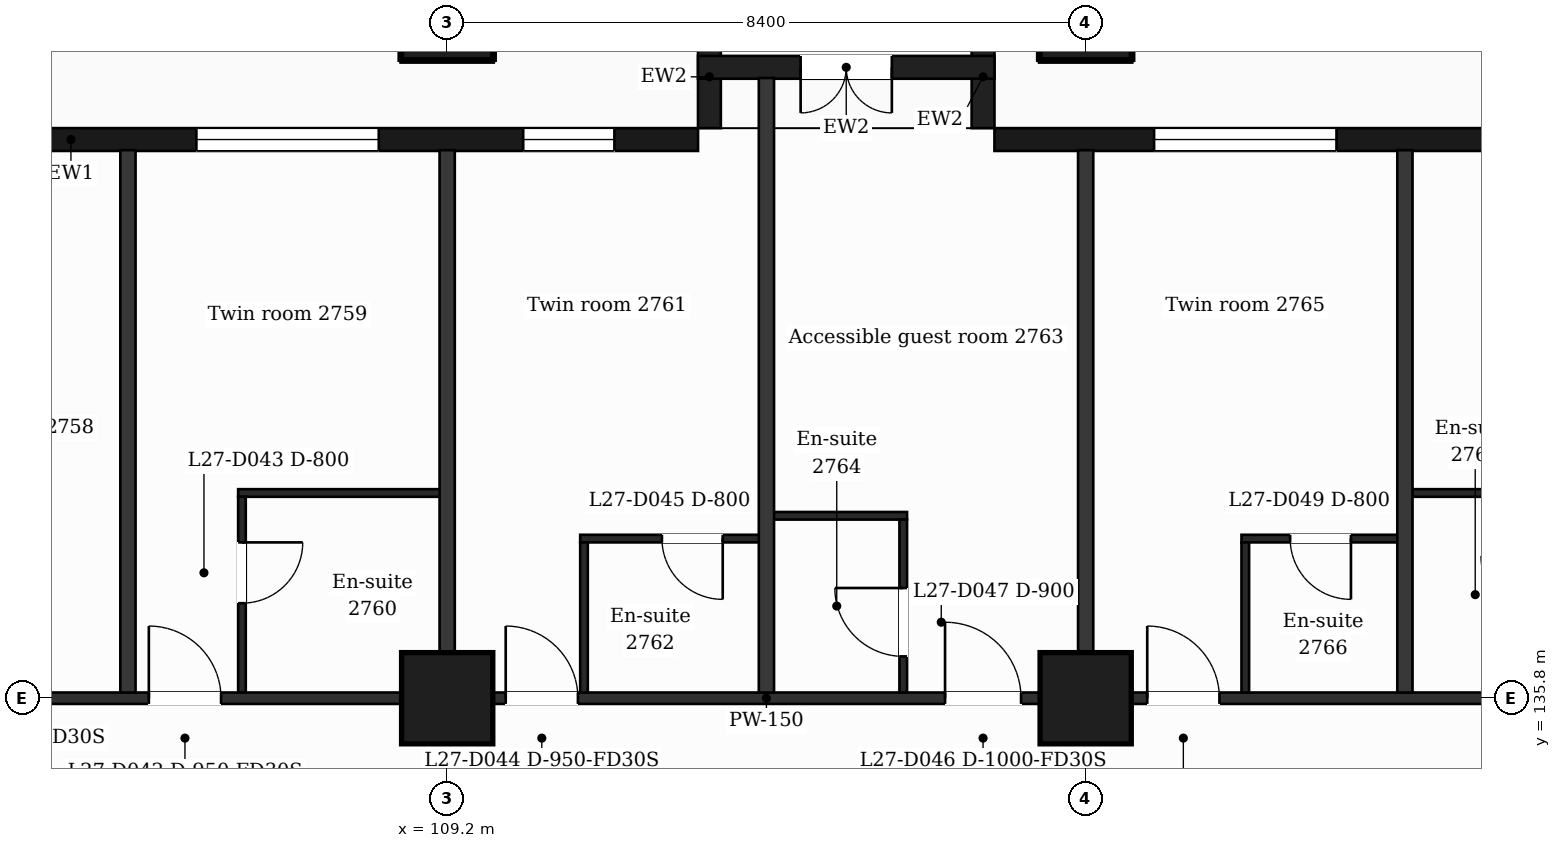
"""IFC4 building model, lengths in metres.
Left out: names, types, materials, properties, quantities, classifications, styles, units other than length and angle.
Written with IfcOpenShell. Run it as: python <this file> out.ifc"""

import sys

from ifc_helpers import new_model, si_unit, direction, frame, frame_2d, origin, origin_2d, place, context, subcontext, project, spatial, rectangle, extrude, element, fill, save


model = new_model("IFC4")
c1 = context("Model", 3, precision=1e-05, world=origin(), true_north=direction((0.0, 1.0)))
c2 = subcontext(c1, "Body", "Model", "MODEL_VIEW")
j1 = project(units=[si_unit("LENGTHUNIT", "METRE"), si_unit("PLANEANGLEUNIT", "RADIAN")], contexts=[c1])
p1 = place(None, origin())
s1 = spatial("IfcSite", under=j1, at=p1, CompositionType="ELEMENT")
p2 = place(p1, origin())
s2 = spatial("IfcBuilding", under=s1, at=p2, CompositionType="ELEMENT")
p3 = place(p2, frame((0.0, 0.0, 116.9)))
s3 = spatial("IfcBuildingStorey", under=s2, at=p3, CompositionType="ELEMENT", Elevation=116.9)
for number, where, z_axis, x_axis in (
    (1, (109.2, 135.8, 0.0), (0.0, 0.0, 1.0), (1.0, 0.0, 0.0)),
    (2, (117.6, 135.8, 0.0), (0.0, 0.0, 1.0), (1.0, 0.0, 0.0)),
    (3, (109.2, 144.8, 0.0), (0.0, 0.0, 1.0), (1.0, 0.0, 0.0)),
    (4, (117.6, 144.8, 0.0), (0.0, 0.0, 1.0), (1.0, 0.0, 0.0)),
):
    element("IfcColumn", number, at=place(p3, frame(where, z_axis=z_axis, x_axis=x_axis)), inside=s3, PredefinedType="COLUMN", context=c2, shape_type="SweptSolid", body=[
        extrude(rectangle(XDim=1.2, YDim=1.2, at=origin_2d()), origin(), (0.0, 0.0, 1.0), 3.7),
    ])
p4 = place(p3, frame((130.65, 143.15, 0.0), z_axis=(0.0, 0.0, 1.0), x_axis=(-1.0, 0.0, 0.0)))
e5 = element("IfcWall", 5, at=p4, inside=s3, PredefinedType="SOLIDWALL", context=c2, shape_type="SweptSolid", body=[
    extrude(rectangle(XDim=14.25, YDim=0.3, at=frame_2d((7.125, 0.0))), origin(), (0.0, 0.0, 1.0), 3.38),
])
p5 = place(p4, frame((1.35, 0.0, 0.9)))
e6 = element("IfcOpeningElement", 6, at=p5, cuts=e5, PredefinedType="OPENING", context=c2, shape_type="SweptSolid", body=[
    extrude(rectangle(XDim=2.4, YDim=2.1, at=frame_2d((1.2, 1.05))), frame((0.0, 0.16, 0.0), z_axis=(0.0, -1.0, 0.0), x_axis=(1.0, 0.0, 0.0)), (0.0, 0.0, 1.0), 0.32),
])
p6 = place(p4, frame((6.15, 0.0, 0.0)))
e7 = element("IfcOpeningElement", 7, at=p6, cuts=e5, PredefinedType="OPENING", context=c2, shape_type="SweptSolid", body=[
    extrude(rectangle(XDim=1.2, YDim=2.4, at=frame_2d((0.6, 1.2))), frame((0.0, 0.16, 0.0), z_axis=(0.0, -1.0, 0.0), x_axis=(1.0, 0.0, 0.0)), (0.0, 0.0, 1.0), 0.32),
])
p7 = place(p4, frame((9.75, 0.0, 0.9)))
e8 = element("IfcOpeningElement", 8, at=p7, cuts=e5, PredefinedType="OPENING", context=c2, shape_type="SweptSolid", body=[
    extrude(rectangle(XDim=2.4, YDim=2.1, at=frame_2d((1.2, 1.05))), frame((0.0, 0.16, 0.0), z_axis=(0.0, -1.0, 0.0), x_axis=(1.0, 0.0, 0.0)), (0.0, 0.0, 1.0), 0.32),
])
p8 = place(p3, frame((112.5, 143.15, 0.0), z_axis=(0.0, 0.0, 1.0), x_axis=(-1.0, 0.0, 0.0)))
e9 = element("IfcWall", 9, at=p8, inside=s3, PredefinedType="SOLIDWALL", context=c2, shape_type="SweptSolid", body=[
    extrude(rectangle(XDim=16.5, YDim=0.3, at=frame_2d((8.25, 0.0))), origin(), (0.0, 0.0, 1.0), 3.38),
])
p9 = place(p8, frame((1.1, 0.0, 0.9)))
e10 = element("IfcOpeningElement", 10, at=p9, cuts=e9, PredefinedType="OPENING", context=c2, shape_type="SweptSolid", body=[
    extrude(rectangle(XDim=1.2, YDim=2.1, at=frame_2d((0.6, 1.05))), frame((0.0, 0.16, 0.0), z_axis=(0.0, -1.0, 0.0), x_axis=(1.0, 0.0, 0.0)), (0.0, 0.0, 1.0), 0.32),
])
p10 = place(p8, frame((4.2, 0.0, 0.9)))
e11 = element("IfcOpeningElement", 11, at=p10, cuts=e9, PredefinedType="OPENING", context=c2, shape_type="SweptSolid", body=[
    extrude(rectangle(XDim=2.4, YDim=2.1, at=frame_2d((1.2, 1.05))), frame((0.0, 0.16, 0.0), z_axis=(0.0, -1.0, 0.0), x_axis=(1.0, 0.0, 0.0)), (0.0, 0.0, 1.0), 0.32),
])
p11 = place(p8, frame((9.0, 0.0, 0.0)))
e12 = element("IfcOpeningElement", 12, at=p11, cuts=e9, PredefinedType="OPENING", context=c2, shape_type="SweptSolid", body=[
    extrude(rectangle(XDim=1.2, YDim=2.4, at=frame_2d((0.6, 1.2))), frame((0.0, 0.16, 0.0), z_axis=(0.0, -1.0, 0.0), x_axis=(1.0, 0.0, 0.0)), (0.0, 0.0, 1.0), 0.32),
])
p12 = place(p8, frame((12.3, 0.0, 0.9)))
e13 = element("IfcOpeningElement", 13, at=p12, cuts=e9, PredefinedType="OPENING", context=c2, shape_type="SweptSolid", body=[
    extrude(rectangle(XDim=1.2, YDim=2.1, at=frame_2d((0.6, 1.05))), frame((0.0, 0.16, 0.0), z_axis=(0.0, -1.0, 0.0), x_axis=(1.0, 0.0, 0.0)), (0.0, 0.0, 1.0), 0.32),
])
p13 = place(p8, frame((14.1, 0.0, 0.9)))
e14 = element("IfcOpeningElement", 14, at=p13, cuts=e9, PredefinedType="OPENING", context=c2, shape_type="SweptSolid", body=[
    extrude(rectangle(XDim=1.2, YDim=2.1, at=frame_2d((0.6, 1.05))), frame((0.0, 0.16, 0.0), z_axis=(0.0, -1.0, 0.0), x_axis=(1.0, 0.0, 0.0)), (0.0, 0.0, 1.0), 0.32),
])
for number, where, z_axis, x_axis in (
    (15, (116.25, 143.3, 0.0), (0.0, 0.0, 1.0), (0.0, 1.0, 0.0)),
    (16, (112.65, 143.3, 0.0), (0.0, 0.0, 1.0), (0.0, 1.0, 0.0)),
):
    element("IfcWall", number, at=place(p3, frame(where, z_axis=z_axis, x_axis=x_axis)), inside=s3, PredefinedType="SOLIDWALL", context=c2, shape_type="SweptSolid", body=[
        extrude(rectangle(XDim=1.35, YDim=0.3, at=frame_2d((0.675, 0.0))), origin(), (0.0, 0.0, 1.0), 3.38),
    ])
p14 = place(p3, frame((116.4, 144.1, 0.0), z_axis=(0.0, 0.0, 1.0), x_axis=(-1.0, 0.0, 0.0)))
e17 = element("IfcWall", 17, at=p14, inside=s3, PredefinedType="SOLIDWALL", context=c2, shape_type="SweptSolid", body=[
    extrude(rectangle(XDim=3.9, YDim=0.3, at=frame_2d((1.95, 0.0))), origin(), (0.0, 0.0, 1.0), 3.38),
])
p15 = place(p14, frame((1.35, 0.0, 0.0)))
e18 = element("IfcOpeningElement", 18, at=p15, cuts=e17, PredefinedType="OPENING", context=c2, shape_type="SweptSolid", body=[
    extrude(rectangle(XDim=1.2, YDim=2.4, at=frame_2d((0.6, 1.2))), frame((0.0, 0.16, 0.0), z_axis=(0.0, -1.0, 0.0), x_axis=(1.0, 0.0, 0.0)), (0.0, 0.0, 1.0), 0.32),
])
p16 = place(p3, frame((90.895, 135.8, 0.0), z_axis=(0.0, 0.0, 1.0), x_axis=(1.0, 0.0, 0.0)))
e19 = element("IfcWall", 19, at=p16, inside=s3, PredefinedType="PARTITIONING", context=c2, shape_type="SweptSolid", body=[
    extrude(rectangle(XDim=45.011, YDim=0.15, at=frame_2d((22.505, 0.0))), origin(), (0.0, 0.0, 1.0), 3.38),
])
p17 = place(p16, frame((8.005, 0.0, 0.0)))
e20 = element("IfcOpeningElement", 20, at=p17, cuts=e19, PredefinedType="OPENING", context=c2, shape_type="SweptSolid", body=[
    extrude(rectangle(XDim=1.0, YDim=2.1, at=frame_2d((0.5, 1.05))), frame((0.0, 0.085, 0.0), z_axis=(0.0, -1.0, 0.0), x_axis=(1.0, 0.0, 0.0)), (0.0, 0.0, 1.0), 0.17),
])
p18 = place(p16, frame((11.785, 0.0, 0.0)))
e21 = element("IfcOpeningElement", 21, at=p18, cuts=e19, PredefinedType="OPENING", context=c2, shape_type="SweptSolid", body=[
    extrude(rectangle(XDim=0.95, YDim=2.1, at=frame_2d((0.475, 1.05))), frame((0.0, 0.085, 0.0), z_axis=(0.0, -1.0, 0.0), x_axis=(1.0, 0.0, 0.0)), (0.0, 0.0, 1.0), 0.17),
])
p19 = place(p16, frame((14.38, 0.0, 0.0)))
e22 = element("IfcOpeningElement", 22, at=p19, cuts=e19, PredefinedType="OPENING", context=c2, shape_type="SweptSolid", body=[
    extrude(rectangle(XDim=0.95, YDim=2.1, at=frame_2d((0.475, 1.05))), frame((0.0, 0.085, 0.0), z_axis=(0.0, -1.0, 0.0), x_axis=(1.0, 0.0, 0.0)), (0.0, 0.0, 1.0), 0.17),
])
p20 = place(p16, frame((19.075, 0.0, 0.0)))
e23 = element("IfcOpeningElement", 23, at=p20, cuts=e19, PredefinedType="OPENING", context=c2, shape_type="SweptSolid", body=[
    extrude(rectangle(XDim=0.95, YDim=2.1, at=frame_2d((0.475, 1.05))), frame((0.0, 0.085, 0.0), z_axis=(0.0, -1.0, 0.0), x_axis=(1.0, 0.0, 0.0)), (0.0, 0.0, 1.0), 0.17),
])
p21 = place(p16, frame((24.855, 0.0, 0.0)))
e24 = element("IfcOpeningElement", 24, at=p21, cuts=e19, PredefinedType="OPENING", context=c2, shape_type="SweptSolid", body=[
    extrude(rectangle(XDim=1.0, YDim=2.1, at=frame_2d((0.5, 1.05))), frame((0.0, 0.085, 0.0), z_axis=(0.0, -1.0, 0.0), x_axis=(1.0, 0.0, 0.0)), (0.0, 0.0, 1.0), 0.17),
])
p22 = place(p16, frame((27.515, 0.0, 0.0)))
e25 = element("IfcOpeningElement", 25, at=p22, cuts=e19, PredefinedType="OPENING", context=c2, shape_type="SweptSolid", body=[
    extrude(rectangle(XDim=0.95, YDim=2.1, at=frame_2d((0.475, 1.05))), frame((0.0, 0.085, 0.0), z_axis=(0.0, -1.0, 0.0), x_axis=(1.0, 0.0, 0.0)), (0.0, 0.0, 1.0), 0.17),
])
p23 = place(p16, frame((33.242, 0.0, 0.0)))
e26 = element("IfcOpeningElement", 26, at=p23, cuts=e19, PredefinedType="OPENING", context=c2, shape_type="SweptSolid", body=[
    extrude(rectangle(XDim=0.95, YDim=2.1, at=frame_2d((0.475, 1.05))), frame((0.0, 0.085, 0.0), z_axis=(0.0, -1.0, 0.0), x_axis=(1.0, 0.0, 0.0)), (0.0, 0.0, 1.0), 0.17),
])
p24 = place(p16, frame((37.105, 0.0, 0.0)))
e27 = element("IfcOpeningElement", 27, at=p24, cuts=e19, PredefinedType="OPENING", context=c2, shape_type="SweptSolid", body=[
    extrude(rectangle(XDim=1.0, YDim=2.1, at=frame_2d((0.5, 1.05))), frame((0.0, 0.085, 0.0), z_axis=(0.0, -1.0, 0.0), x_axis=(1.0, 0.0, 0.0)), (0.0, 0.0, 1.0), 0.17),
])
p25 = place(p3, frame((110.95, 137.9, 0.0), z_axis=(0.0, 0.0, 1.0), x_axis=(1.0, 0.0, 0.0)))
e28 = element("IfcWall", 28, at=p25, inside=s3, PredefinedType="PARTITIONING", context=c2, shape_type="SweptSolid", body=[
    extrude(rectangle(XDim=2.45, YDim=0.1, at=frame_2d((1.225, 0.0))), origin(), (0.0, 0.0, 1.0), 3.38),
])
p26 = place(p25, frame((1.075, 0.0, 0.0)))
e29 = element("IfcOpeningElement", 29, at=p26, cuts=e28, PredefinedType="OPENING", context=c2, shape_type="SweptSolid", body=[
    extrude(rectangle(XDim=0.8, YDim=2.1, at=frame_2d((0.4, 1.05))), frame((0.0, 0.06, 0.0), z_axis=(0.0, -1.0, 0.0), x_axis=(1.0, 0.0, 0.0)), (0.0, 0.0, 1.0), 0.12),
])
p27 = place(p3, frame((119.65, 137.9, 0.0), z_axis=(0.0, 0.0, 1.0), x_axis=(1.0, 0.0, 0.0)))
e30 = element("IfcWall", 30, at=p27, inside=s3, PredefinedType="PARTITIONING", context=c2, shape_type="SweptSolid", body=[
    extrude(rectangle(XDim=2.15, YDim=0.1, at=frame_2d((1.075, 0.0))), origin(), (0.0, 0.0, 1.0), 3.38),
])
p28 = place(p27, frame((0.64, 0.0, 0.0)))
e31 = element("IfcOpeningElement", 31, at=p28, cuts=e30, PredefinedType="OPENING", context=c2, shape_type="SweptSolid", body=[
    extrude(rectangle(XDim=0.8, YDim=2.1, at=frame_2d((0.4, 1.05))), frame((0.0, 0.06, 0.0), z_axis=(0.0, -1.0, 0.0), x_axis=(1.0, 0.0, 0.0)), (0.0, 0.0, 1.0), 0.12),
])
p29 = place(p3, frame((113.4, 138.2, 0.0), z_axis=(0.0, 0.0, 1.0), x_axis=(1.0, 0.0, 0.0)))
e32 = element("IfcWall", 32, at=p29, inside=s3, PredefinedType="PARTITIONING", context=c2, shape_type="SweptSolid", body=[
    extrude(rectangle(XDim=1.85, YDim=0.1, at=frame_2d((0.925, 0.0))), origin(), (0.0, 0.0, 1.0), 3.38),
])
p30 = place(p3, frame((106.45, 138.5, 0.0), z_axis=(0.0, 0.0, 1.0), x_axis=(1.0, 0.0, 0.0)))
e33 = element("IfcWall", 33, at=p30, inside=s3, PredefinedType="PARTITIONING", context=c2, shape_type="SweptSolid", body=[
    extrude(rectangle(XDim=2.75, YDim=0.1, at=frame_2d((1.375, 0.0))), origin(), (0.0, 0.0, 1.0), 3.38),
])
p31 = place(p3, frame((121.8, 138.5, 0.0), z_axis=(0.0, 0.0, 1.0), x_axis=(1.0, 0.0, 0.0)))
e34 = element("IfcWall", 34, at=p31, inside=s3, PredefinedType="PARTITIONING", context=c2, shape_type="SweptSolid", body=[
    extrude(rectangle(XDim=1.85, YDim=0.1, at=frame_2d((0.925, 0.0))), origin(), (0.0, 0.0, 1.0), 3.38),
])
p32 = place(p3, frame((105.0, 135.875, 0.0), z_axis=(0.0, 0.0, 1.0), x_axis=(0.0, 1.0, 0.0)))
e35 = element("IfcWall", 35, at=p32, inside=s3, PredefinedType="PARTITIONING", context=c2, shape_type="SweptSolid", body=[
    extrude(rectangle(XDim=7.135, YDim=0.2, at=frame_2d((3.567, 0.0))), origin(), (0.0, 0.0, 1.0), 3.38),
])
p33 = place(p3, frame((106.5, 135.875, 0.0), z_axis=(0.0, 0.0, 1.0), x_axis=(0.0, 1.0, 0.0)))
e36 = element("IfcWall", 36, at=p33, inside=s3, PredefinedType="PARTITIONING", context=c2, shape_type="SweptSolid", body=[
    extrude(rectangle(XDim=2.575, YDim=0.1, at=frame_2d((1.288, 0.0))), origin(), (0.0, 0.0, 1.0), 3.38),
])
p34 = place(p33, frame((1.175, 0.0, 0.0)))
e37 = element("IfcOpeningElement", 37, at=p34, cuts=e36, PredefinedType="OPENING", context=c2, shape_type="SweptSolid", body=[
    extrude(rectangle(XDim=0.8, YDim=2.1, at=frame_2d((0.4, 1.05))), frame((0.0, 0.06, 0.0), z_axis=(0.0, -1.0, 0.0), x_axis=(1.0, 0.0, 0.0)), (0.0, 0.0, 1.0), 0.12),
])
p35 = place(p3, frame((109.2, 135.875, 0.0), z_axis=(0.0, 0.0, 1.0), x_axis=(0.0, 1.0, 0.0)))
e38 = element("IfcWall", 38, at=p35, inside=s3, PredefinedType="PARTITIONING", context=c2, shape_type="SweptSolid", body=[
    extrude(rectangle(XDim=7.135, YDim=0.2, at=frame_2d((3.567, 0.0))), origin(), (0.0, 0.0, 1.0), 3.38),
])
p36 = place(p3, frame((111.0, 135.875, 0.0), z_axis=(0.0, 0.0, 1.0), x_axis=(0.0, 1.0, 0.0)))
e39 = element("IfcWall", 39, at=p36, inside=s3, PredefinedType="PARTITIONING", context=c2, shape_type="SweptSolid", body=[
    extrude(rectangle(XDim=1.975, YDim=0.1, at=frame_2d((0.988, 0.0))), origin(), (0.0, 0.0, 1.0), 3.38),
])
p37 = place(p3, frame((113.4, 135.875, 0.0), z_axis=(0.0, 0.0, 1.0), x_axis=(0.0, 1.0, 0.0)))
e40 = element("IfcWall", 40, at=p37, inside=s3, PredefinedType="PARTITIONING", context=c2, shape_type="SweptSolid", body=[
    extrude(rectangle(XDim=8.085, YDim=0.2, at=frame_2d((4.042, 0.0))), origin(), (0.0, 0.0, 1.0), 3.38),
])
p38 = place(p3, frame((115.2, 135.875, 0.0), z_axis=(0.0, 0.0, 1.0), x_axis=(0.0, 1.0, 0.0)))
e41 = element("IfcWall", 41, at=p38, inside=s3, PredefinedType="PARTITIONING", context=c2, shape_type="SweptSolid", body=[
    extrude(rectangle(XDim=2.275, YDim=0.1, at=frame_2d((1.137, 0.0))), origin(), (0.0, 0.0, 1.0), 3.38),
])
p39 = place(p38, frame((0.475, 0.0, 0.0)))
e42 = element("IfcOpeningElement", 42, at=p39, cuts=e41, PredefinedType="OPENING", context=c2, shape_type="SweptSolid", body=[
    extrude(rectangle(XDim=0.9, YDim=2.1, at=frame_2d((0.45, 1.05))), frame((0.0, 0.06, 0.0), z_axis=(0.0, -1.0, 0.0), x_axis=(1.0, 0.0, 0.0)), (0.0, 0.0, 1.0), 0.12),
])
p40 = place(p3, frame((117.6, 135.875, 0.0), z_axis=(0.0, 0.0, 1.0), x_axis=(0.0, 1.0, 0.0)))
e43 = element("IfcWall", 43, at=p40, inside=s3, PredefinedType="PARTITIONING", context=c2, shape_type="SweptSolid", body=[
    extrude(rectangle(XDim=7.135, YDim=0.2, at=frame_2d((3.567, 0.0))), origin(), (0.0, 0.0, 1.0), 3.38),
])
p41 = place(p3, frame((119.7, 135.875, 0.0), z_axis=(0.0, 0.0, 1.0), x_axis=(0.0, 1.0, 0.0)))
e44 = element("IfcWall", 44, at=p41, inside=s3, PredefinedType="PARTITIONING", context=c2, shape_type="SweptSolid", body=[
    extrude(rectangle(XDim=1.975, YDim=0.1, at=frame_2d((0.988, 0.0))), origin(), (0.0, 0.0, 1.0), 3.38),
])
p42 = place(p3, frame((121.8, 135.875, 0.0), z_axis=(0.0, 0.0, 1.0), x_axis=(0.0, 1.0, 0.0)))
e45 = element("IfcWall", 45, at=p42, inside=s3, PredefinedType="PARTITIONING", context=c2, shape_type="SweptSolid", body=[
    extrude(rectangle(XDim=7.135, YDim=0.2, at=frame_2d((3.567, 0.0))), origin(), (0.0, 0.0, 1.0), 3.38),
])
p43 = place(p7, origin())
e46 = element("IfcWindow", 46, at=p43, inside=s3, PartitioningType="SINGLE_PANEL", PredefinedType="WINDOW", context=c2, shape_type="SweptSolid", body=[
    extrude(rectangle(XDim=2.4, YDim=2.1, at=frame_2d((1.2, 1.05))), frame((0.0, 0.03, 0.0), z_axis=(0.0, -1.0, 0.0), x_axis=(1.0, 0.0, 0.0)), (0.0, 0.0, 1.0), 0.06),
])
fill(e8, e46)
p44 = place(p9, origin())
e47 = element("IfcWindow", 47, at=p44, inside=s3, PartitioningType="SINGLE_PANEL", PredefinedType="WINDOW", context=c2, shape_type="SweptSolid", body=[
    extrude(rectangle(XDim=1.2, YDim=2.1, at=frame_2d((0.6, 1.05))), frame((0.0, 0.03, 0.0), z_axis=(0.0, -1.0, 0.0), x_axis=(1.0, 0.0, 0.0)), (0.0, 0.0, 1.0), 0.06),
])
fill(e10, e47)
p45 = place(p10, origin())
e48 = element("IfcWindow", 48, at=p45, inside=s3, PartitioningType="SINGLE_PANEL", PredefinedType="WINDOW", context=c2, shape_type="SweptSolid", body=[
    extrude(rectangle(XDim=2.4, YDim=2.1, at=frame_2d((1.2, 1.05))), frame((0.0, 0.03, 0.0), z_axis=(0.0, -1.0, 0.0), x_axis=(1.0, 0.0, 0.0)), (0.0, 0.0, 1.0), 0.06),
])
fill(e11, e48)
p46 = place(p15, origin())
e49 = element("IfcDoor", 49, at=p46, inside=s3, OperationType="DOUBLE_DOOR_SINGLE_SWING", PredefinedType="DOOR", context=c2, shape_type="SweptSolid", body=[
    extrude(rectangle(XDim=1.2, YDim=2.4, at=frame_2d((0.6, 1.2))), frame((0.0, 0.025, 0.0), z_axis=(0.0, -1.0, 0.0), x_axis=(1.0, 0.0, 0.0)), (0.0, 0.0, 1.0), 0.05),
])
fill(e18, e49)
p47 = place(p19, origin())
e50 = element("IfcDoor", 50, at=p47, inside=s3, OperationType="SINGLE_SWING_LEFT", PredefinedType="DOOR", context=c2, shape_type="SweptSolid", body=[
    extrude(rectangle(XDim=0.95, YDim=2.1, at=frame_2d((0.475, 1.05))), frame((0.0, 0.025, 0.0), z_axis=(0.0, -1.0, 0.0), x_axis=(1.0, 0.0, 0.0)), (0.0, 0.0, 1.0), 0.05),
])
fill(e22, e50)
p48 = place(p34, origin())
e51 = element("IfcDoor", 51, at=p48, inside=s3, OperationType="SINGLE_SWING_RIGHT", PredefinedType="DOOR", context=c2, shape_type="SweptSolid", body=[
    extrude(rectangle(XDim=0.8, YDim=2.1, at=frame_2d((0.4, 1.05))), frame((0.0, 0.025, 0.0), z_axis=(0.0, -1.0, 0.0), x_axis=(1.0, 0.0, 0.0)), (0.0, 0.0, 1.0), 0.05),
])
fill(e37, e51)
p49 = place(p20, origin())
e52 = element("IfcDoor", 52, at=p49, inside=s3, OperationType="SINGLE_SWING_LEFT", PredefinedType="DOOR", context=c2, shape_type="SweptSolid", body=[
    extrude(rectangle(XDim=0.95, YDim=2.1, at=frame_2d((0.475, 1.05))), frame((0.0, 0.025, 0.0), z_axis=(0.0, -1.0, 0.0), x_axis=(1.0, 0.0, 0.0)), (0.0, 0.0, 1.0), 0.05),
])
fill(e23, e52)
p50 = place(p26, origin())
e53 = element("IfcDoor", 53, at=p50, inside=s3, OperationType="SINGLE_SWING_RIGHT", PredefinedType="DOOR", context=c2, shape_type="SweptSolid", body=[
    extrude(rectangle(XDim=0.8, YDim=2.1, at=frame_2d((0.4, 1.05))), frame((0.0, 0.025, 0.0), z_axis=(0.0, -1.0, 0.0), x_axis=(1.0, 0.0, 0.0)), (0.0, 0.0, 1.0), 0.05),
])
fill(e29, e53)
p51 = place(p21, origin())
e54 = element("IfcDoor", 54, at=p51, inside=s3, OperationType="SINGLE_SWING_LEFT", PredefinedType="DOOR", context=c2, shape_type="SweptSolid", body=[
    extrude(rectangle(XDim=1.0, YDim=2.1, at=frame_2d((0.5, 1.05))), frame((0.0, 0.025, 0.0), z_axis=(0.0, -1.0, 0.0), x_axis=(1.0, 0.0, 0.0)), (0.0, 0.0, 1.0), 0.05),
])
fill(e24, e54)
p52 = place(p39, origin())
e55 = element("IfcDoor", 55, at=p52, inside=s3, OperationType="SINGLE_SWING_RIGHT", PredefinedType="DOOR", context=c2, shape_type="SweptSolid", body=[
    extrude(rectangle(XDim=0.9, YDim=2.1, at=frame_2d((0.45, 1.05))), frame((0.0, 0.025, 0.0), z_axis=(0.0, -1.0, 0.0), x_axis=(1.0, 0.0, 0.0)), (0.0, 0.0, 1.0), 0.05),
])
fill(e42, e55)
p53 = place(p22, origin())
e56 = element("IfcDoor", 56, at=p53, inside=s3, OperationType="SINGLE_SWING_LEFT", PredefinedType="DOOR", context=c2, shape_type="SweptSolid", body=[
    extrude(rectangle(XDim=0.95, YDim=2.1, at=frame_2d((0.475, 1.05))), frame((0.0, 0.025, 0.0), z_axis=(0.0, -1.0, 0.0), x_axis=(1.0, 0.0, 0.0)), (0.0, 0.0, 1.0), 0.05),
])
fill(e25, e56)
p54 = place(p28, origin())
e57 = element("IfcDoor", 57, at=p54, inside=s3, OperationType="SINGLE_SWING_RIGHT", PredefinedType="DOOR", context=c2, shape_type="SweptSolid", body=[
    extrude(rectangle(XDim=0.8, YDim=2.1, at=frame_2d((0.4, 1.05))), frame((0.0, 0.025, 0.0), z_axis=(0.0, -1.0, 0.0), x_axis=(1.0, 0.0, 0.0)), (0.0, 0.0, 1.0), 0.05),
])
fill(e31, e57)
save(model, sys.argv[1])
